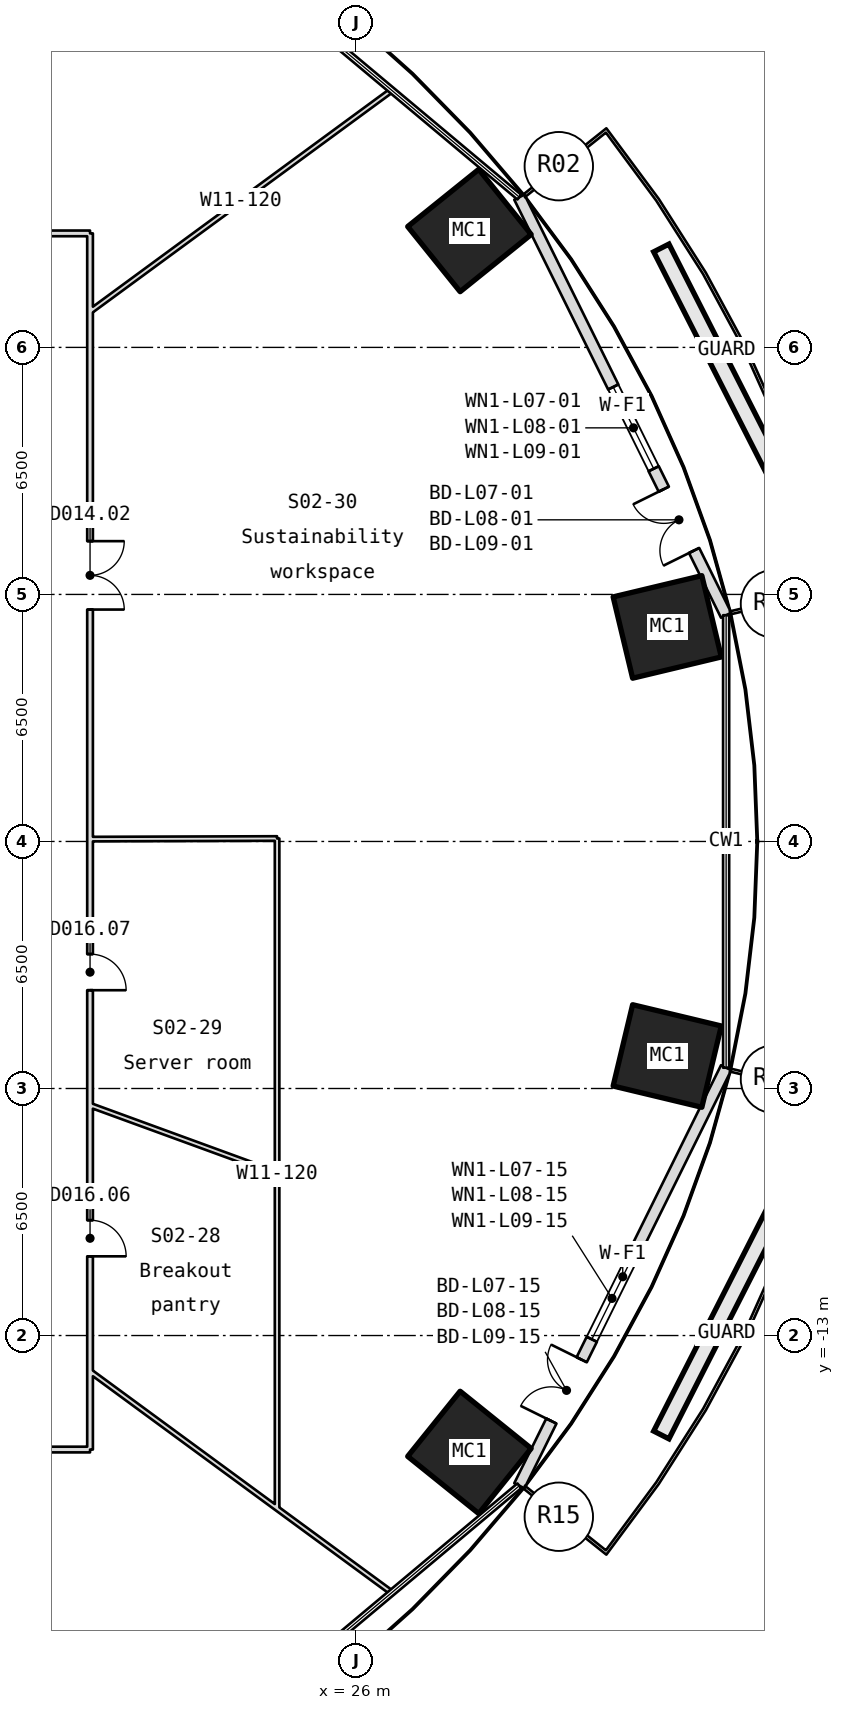
"""IFC4 building model, lengths in metres.
Left out: names, types, materials, properties, quantities, classifications, styles, units other than length and angle.
Written with IfcOpenShell. Run it as: python <this file> out.ifc"""

import sys

from ifc_helpers import new_model, si_unit, direction, frame, frame_2d, origin, origin_2d, place, context, subcontext, project, spatial, rectangle, hollow_rectangle, extrude, element, fill, save


model = new_model("IFC4")
c1 = context("Model", 3, precision=1e-05, world=origin(), true_north=direction((0.0, 1.0)))
c2 = subcontext(c1, "Body", "Model", "MODEL_VIEW")
j1 = project(units=[si_unit("LENGTHUNIT", "METRE"), si_unit("PLANEANGLEUNIT", "RADIAN")], contexts=[c1])
p1 = place(None, origin())
s1 = spatial("IfcSite", under=j1, at=p1, CompositionType="ELEMENT")
p2 = place(p1, origin())
s2 = spatial("IfcBuilding", under=s1, at=p2, CompositionType="ELEMENT")
p3 = place(p2, frame((0.0, 0.0, 45.45)))
s3 = spatial("IfcBuildingStorey", under=s2, at=p3, CompositionType="ELEMENT", Elevation=45.45)
for number, where, z_axis, x_axis in (
    (1, (34.188, 5.645, -0.18), (0.0, 0.0, 1.0), (0.233, -0.972, 0.0)),
    (2, (28.983, 16.075, -0.18), (0.0, 0.0, 1.0), (0.627, -0.779, 0.0)),
    (3, (28.983, -16.075, -0.18), (0.0, 0.0, 1.0), (-0.627, -0.779, 0.0)),
    (4, (34.188, -5.645, -0.18), (0.0, 0.0, 1.0), (-0.233, -0.972, 0.0)),
):
    element("IfcColumn", number, at=place(p3, frame(where, z_axis=z_axis, x_axis=x_axis)), inside=s3, PredefinedType="COLUMN", context=c2, shape_type="SweptSolid", body=[
        extrude(hollow_rectangle(XDim=2.2, YDim=2.4, WallThickness=0.09, at=origin_2d()), origin(), (0.0, 0.0, 1.0), 4.15),
    ])
p4 = place(p3, frame((35.738, 5.953, 0.0), z_axis=(0.0, 0.0, 1.0), x_axis=(-0.443341984676, 0.89635254483, 0.0)))
e5 = element("IfcWall", 5, at=p4, inside=s3, PredefinedType="SOLIDWALL", context=c2, shape_type="SweptSolid", body=[
    extrude(rectangle(XDim=12.272, YDim=0.3, at=frame_2d((6.136, 0.0))), origin(), (0.0, 0.0, 1.0), 3.97),
])
p5 = place(p4, frame((1.9, 0.0, 0.0)))
e6 = element("IfcOpeningElement", 6, at=p5, cuts=e5, PredefinedType="OPENING", context=c2, shape_type="SweptSolid", body=[
    extrude(rectangle(XDim=1.8, YDim=2.4, at=frame_2d((0.9, 1.2))), frame((0.0, 0.16, 0.0), z_axis=(0.0, -1.0, 0.0), x_axis=(1.0, 0.0, 0.0)), (0.0, 0.0, 1.0), 0.32),
])
p6 = place(p4, frame((4.3, 0.0, 0.9)))
e7 = element("IfcOpeningElement", 7, at=p6, cuts=e5, PredefinedType="OPENING", context=c2, shape_type="SweptSolid", body=[
    extrude(rectangle(XDim=2.4, YDim=1.5, at=frame_2d((1.2, 0.75))), frame((0.0, 0.16, 0.0), z_axis=(0.0, -1.0, 0.0), x_axis=(1.0, 0.0, 0.0)), (0.0, 0.0, 1.0), 0.32),
])
p7 = place(p3, frame((30.297, -16.953, 0.0), z_axis=(0.0, 0.0, 1.0), x_axis=(0.443341984676, 0.89635254483, 0.0)))
e8 = element("IfcWall", 8, at=p7, inside=s3, PredefinedType="SOLIDWALL", context=c2, shape_type="SweptSolid", body=[
    extrude(rectangle(XDim=12.272, YDim=0.3, at=frame_2d((6.136, 0.0))), origin(), (0.0, 0.0, 1.0), 3.97),
])
p8 = place(p7, frame((1.9, 0.0, 0.0)))
e9 = element("IfcOpeningElement", 9, at=p8, cuts=e8, PredefinedType="OPENING", context=c2, shape_type="SweptSolid", body=[
    extrude(rectangle(XDim=1.8, YDim=2.4, at=frame_2d((0.9, 1.2))), frame((0.0, 0.16, 0.0), z_axis=(0.0, -1.0, 0.0), x_axis=(1.0, 0.0, 0.0)), (0.0, 0.0, 1.0), 0.32),
])
p9 = place(p7, frame((4.3, 0.0, 0.9)))
e10 = element("IfcOpeningElement", 10, at=p9, cuts=e8, PredefinedType="OPENING", context=c2, shape_type="SweptSolid", body=[
    extrude(rectangle(XDim=2.4, YDim=1.5, at=frame_2d((1.2, 0.75))), frame((0.0, 0.16, 0.0), z_axis=(0.0, -1.0, 0.0), x_axis=(1.0, 0.0, 0.0)), (0.0, 0.0, 1.0), 0.32),
])
p10 = place(p3, frame((-19.0, 16.0, 0.0), z_axis=(0.0, 0.0, 1.0), x_axis=(1.0, 0.0, 0.0)))
e11 = element("IfcWall", 11, at=p10, inside=s3, PredefinedType="PARTITIONING", context=c2, shape_type="SweptSolid", body=[
    extrude(rectangle(XDim=38.0, YDim=0.15, at=frame_2d((19.0, 0.0))), origin(), (0.0, 0.0, 1.0), 3.97),
])
p11 = place(p10, frame((18.1, 0.0, 0.0)))
e12 = element("IfcOpeningElement", 12, at=p11, cuts=e11, PredefinedType="OPENING", context=c2, shape_type="SweptSolid", body=[
    extrude(rectangle(XDim=1.8, YDim=2.1, at=frame_2d((0.9, 1.05))), frame((0.0, 0.085, 0.0), z_axis=(0.0, -1.0, 0.0), x_axis=(1.0, 0.0, 0.0)), (0.0, 0.0, 1.0), 0.17),
])
p12 = place(p3, frame((19.0, -16.0, 0.0), z_axis=(0.0, 0.0, 1.0), x_axis=(-1.0, 0.0, 0.0)))
e13 = element("IfcWall", 13, at=p12, inside=s3, PredefinedType="PARTITIONING", context=c2, shape_type="SweptSolid", body=[
    extrude(rectangle(XDim=38.0, YDim=0.15, at=frame_2d((19.0, 0.0))), origin(), (0.0, 0.0, 1.0), 3.97),
])
p13 = place(p12, frame((18.525, 0.0, 0.0)))
e14 = element("IfcOpeningElement", 14, at=p13, cuts=e13, PredefinedType="OPENING", context=c2, shape_type="SweptSolid", body=[
    extrude(rectangle(XDim=0.95, YDim=2.1, at=frame_2d((0.475, 1.05))), frame((0.0, 0.085, 0.0), z_axis=(0.0, -1.0, 0.0), x_axis=(1.0, 0.0, 0.0)), (0.0, 0.0, 1.0), 0.17),
])
p14 = place(p3, frame((19.0, -13.941, 0.0), z_axis=(0.0, 0.0, 1.0), x_axis=(0.806231534746, -0.591600128787, 0.0)))
e15 = element("IfcWall", 15, at=p14, inside=s3, PredefinedType="PARTITIONING", context=c2, shape_type="SweptSolid", body=[
    extrude(rectangle(XDim=9.846, YDim=0.12, at=frame_2d((4.923, 0.0))), origin(), (0.0, 0.0, 1.0), 3.97),
])
p15 = place(p3, frame((19.0, 13.941, 0.0), z_axis=(0.0, 0.0, 1.0), x_axis=(0.806243361472, 0.59158401101, 0.0)))
e16 = element("IfcWall", 16, at=p15, inside=s3, PredefinedType="PARTITIONING", context=c2, shape_type="SweptSolid", body=[
    extrude(rectangle(XDim=9.846, YDim=0.12, at=frame_2d((4.923, 0.0))), origin(), (0.0, 0.0, 1.0), 3.97),
])
p16 = place(p3, frame((19.0, 16.0, 0.0), z_axis=(0.0, 0.0, 1.0), x_axis=(0.0, -1.0, 0.0)))
e17 = element("IfcWall", 17, at=p16, inside=s3, PredefinedType="PARTITIONING", context=c2, shape_type="SweptSolid", body=[
    extrude(rectangle(XDim=32.0, YDim=0.15, at=frame_2d((16.0, 0.0))), origin(), (0.0, 0.0, 1.0), 3.97),
])
p17 = place(p16, frame((25.966, 0.0, 0.0)))
e18 = element("IfcOpeningElement", 18, at=p17, cuts=e17, PredefinedType="OPENING", context=c2, shape_type="SweptSolid", body=[
    extrude(rectangle(XDim=0.95, YDim=2.1, at=frame_2d((0.475, 1.05))), frame((0.0, 0.085, 0.0), z_axis=(0.0, -1.0, 0.0), x_axis=(1.0, 0.0, 0.0)), (0.0, 0.0, 1.0), 0.17),
])
p18 = place(p16, frame((18.964, 0.0, 0.0)))
e19 = element("IfcOpeningElement", 19, at=p18, cuts=e17, PredefinedType="OPENING", context=c2, shape_type="SweptSolid", body=[
    extrude(rectangle(XDim=0.95, YDim=2.1, at=frame_2d((0.475, 1.05))), frame((0.0, 0.085, 0.0), z_axis=(0.0, -1.0, 0.0), x_axis=(1.0, 0.0, 0.0)), (0.0, 0.0, 1.0), 0.17),
])
p19 = place(p16, frame((8.098, 0.0, 0.0)))
e20 = element("IfcOpeningElement", 20, at=p19, cuts=e17, PredefinedType="OPENING", context=c2, shape_type="SweptSolid", body=[
    extrude(rectangle(XDim=1.8, YDim=2.1, at=frame_2d((0.9, 1.05))), frame((0.0, 0.085, 0.0), z_axis=(0.0, -1.0, 0.0), x_axis=(1.0, 0.0, 0.0)), (0.0, 0.0, 1.0), 0.17),
])
p20 = place(p3, frame((23.922, -17.552, 0.0), z_axis=(0.0, 0.0, 1.0), x_axis=(0.0, 1.0, 0.0)))
e21 = element("IfcWall", 21, at=p20, inside=s3, PredefinedType="PARTITIONING", context=c2, shape_type="SweptSolid", body=[
    extrude(rectangle(XDim=17.631, YDim=0.12, at=frame_2d((8.815, 0.0))), origin(), (0.0, 0.0, 1.0), 3.97),
])
p21 = place(p3, frame((23.922, -8.737, 0.0), z_axis=(0.0, 0.0, 1.0), x_axis=(-0.939306799008, 0.343078325368, 0.0)))
e22 = element("IfcWall", 22, at=p21, inside=s3, PredefinedType="PARTITIONING", context=c2, shape_type="SweptSolid", body=[
    extrude(rectangle(XDim=5.24, YDim=0.12, at=frame_2d((2.62, 0.0))), origin(), (0.0, 0.0, 1.0), 3.97),
])
p22 = place(p3, frame((23.922, 0.078, 0.0), z_axis=(0.0, 0.0, 1.0), x_axis=(-0.999994640597, -0.003273954377, 0.0)))
e23 = element("IfcWall", 23, at=p22, inside=s3, PredefinedType="PARTITIONING", context=c2, shape_type="SweptSolid", body=[
    extrude(rectangle(XDim=4.922, YDim=0.12, at=frame_2d((2.461, 0.0))), origin(), (0.0, 0.0, 1.0), 3.97),
])
p23 = place(p5, origin())
e24 = element("IfcDoor", 24, at=p23, inside=s3, OperationType="SINGLE_SWING_LEFT", PredefinedType="DOOR", context=c2, shape_type="SweptSolid", body=[
    extrude(rectangle(XDim=1.8, YDim=2.4, at=frame_2d((0.9, 1.2))), frame((0.0, 0.025, 0.0), z_axis=(0.0, -1.0, 0.0), x_axis=(1.0, 0.0, 0.0)), (0.0, 0.0, 1.0), 0.05),
])
fill(e6, e24)
p24 = place(p6, origin())
e25 = element("IfcWindow", 25, at=p24, inside=s3, PartitioningType="SINGLE_PANEL", PredefinedType="WINDOW", context=c2, shape_type="SweptSolid", body=[
    extrude(rectangle(XDim=2.4, YDim=1.5, at=frame_2d((1.2, 0.75))), frame((0.0, 0.03, 0.0), z_axis=(0.0, -1.0, 0.0), x_axis=(1.0, 0.0, 0.0)), (0.0, 0.0, 1.0), 0.06),
])
fill(e7, e25)
p25 = place(p8, origin())
e26 = element("IfcDoor", 26, at=p25, inside=s3, OperationType="SINGLE_SWING_LEFT", PredefinedType="DOOR", context=c2, shape_type="SweptSolid", body=[
    extrude(rectangle(XDim=1.8, YDim=2.4, at=frame_2d((0.9, 1.2))), frame((0.0, 0.025, 0.0), z_axis=(0.0, -1.0, 0.0), x_axis=(1.0, 0.0, 0.0)), (0.0, 0.0, 1.0), 0.05),
])
fill(e9, e26)
p26 = place(p9, origin())
e27 = element("IfcWindow", 27, at=p26, inside=s3, PartitioningType="SINGLE_PANEL", PredefinedType="WINDOW", context=c2, shape_type="SweptSolid", body=[
    extrude(rectangle(XDim=2.4, YDim=1.5, at=frame_2d((1.2, 0.75))), frame((0.0, 0.03, 0.0), z_axis=(0.0, -1.0, 0.0), x_axis=(1.0, 0.0, 0.0)), (0.0, 0.0, 1.0), 0.06),
])
fill(e10, e27)
p27 = place(p17, origin())
e28 = element("IfcDoor", 28, at=p27, inside=s3, OperationType="SINGLE_SWING_RIGHT", PredefinedType="DOOR", context=c2, shape_type="SweptSolid", body=[
    extrude(rectangle(XDim=0.95, YDim=2.1, at=frame_2d((0.475, 1.05))), frame((0.0, 0.025, 0.0), z_axis=(0.0, -1.0, 0.0), x_axis=(1.0, 0.0, 0.0)), (0.0, 0.0, 1.0), 0.05),
])
fill(e18, e28)
p28 = place(p18, origin())
e29 = element("IfcDoor", 29, at=p28, inside=s3, OperationType="SINGLE_SWING_RIGHT", PredefinedType="DOOR", context=c2, shape_type="SweptSolid", body=[
    extrude(rectangle(XDim=0.95, YDim=2.1, at=frame_2d((0.475, 1.05))), frame((0.0, 0.025, 0.0), z_axis=(0.0, -1.0, 0.0), x_axis=(1.0, 0.0, 0.0)), (0.0, 0.0, 1.0), 0.05),
])
fill(e19, e29)
p29 = place(p19, origin())
e30 = element("IfcDoor", 30, at=p29, inside=s3, OperationType="DOUBLE_DOOR_SINGLE_SWING", PredefinedType="DOOR", context=c2, shape_type="SweptSolid", body=[
    extrude(rectangle(XDim=1.8, YDim=2.1, at=frame_2d((0.9, 1.05))), frame((0.0, 0.025, 0.0), z_axis=(0.0, -1.0, 0.0), x_axis=(1.0, 0.0, 0.0)), (0.0, 0.0, 1.0), 0.05),
])
fill(e20, e30)
save(model, sys.argv[1])
